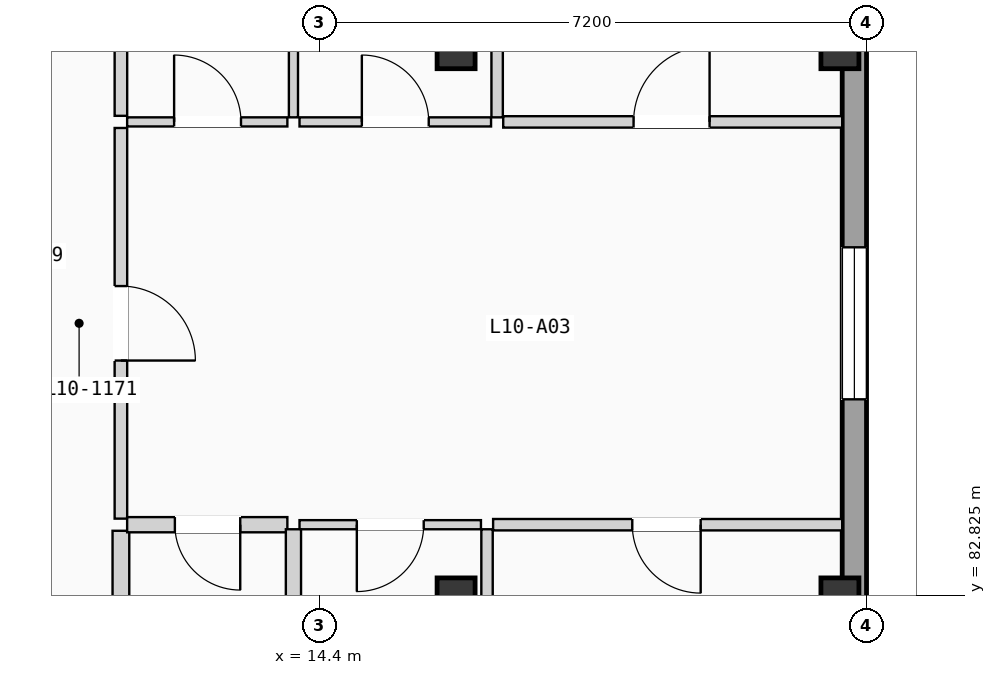
"""IFC4 building model, lengths in metres.
Left out: names, types, materials, properties, quantities, classifications, styles, units other than length and angle.
Written with IfcOpenShell. Run it as: python <this file> out.ifc"""

import sys

from ifc_helpers import new_model, si_unit, direction, frame, frame_2d, origin, origin_2d, place, context, subcontext, project, spatial, rectangle, extrude, element, fill, save


model = new_model("IFC4")
c1 = context("Model", 3, precision=1e-05, world=origin(), true_north=direction((0.0, 1.0)))
c2 = subcontext(c1, "Body", "Model", "MODEL_VIEW")
j1 = project(units=[si_unit("LENGTHUNIT", "METRE"), si_unit("PLANEANGLEUNIT", "RADIAN")], contexts=[c1])
p1 = place(None, origin())
s1 = spatial("IfcSite", under=j1, at=p1, CompositionType="ELEMENT")
p2 = place(p1, origin())
s2 = spatial("IfcBuilding", under=s1, at=p2, CompositionType="ELEMENT")
p3 = place(p2, frame((0.0, 0.0, 34.125)))
s3 = spatial("IfcBuildingStorey", under=s2, at=p3, CompositionType="ELEMENT", Elevation=34.125)
for number, where, z_axis, x_axis in (
    (1, (16.2, 82.8, 0.0), (0.0, 0.0, 1.0), (1.0, 0.0, 0.0)),
    (2, (16.2, 90.0, 0.0), (0.0, 0.0, 1.0), (1.0, 0.0, 0.0)),
    (3, (21.25, 82.8, 0.0), (0.0, 0.0, 1.0), (1.0, 0.0, 0.0)),
    (4, (21.25, 90.0, 0.0), (0.0, 0.0, 1.0), (1.0, 0.0, 0.0)),
):
    element("IfcColumn", number, at=place(p3, frame(where, z_axis=z_axis, x_axis=x_axis)), inside=s3, PredefinedType="COLUMN", context=c2, shape_type="SweptSolid", body=[
        extrude(rectangle(XDim=0.5, YDim=0.5, at=origin_2d()), origin(), (0.0, 0.0, 1.0), 3.15),
    ])
p4 = place(p3, frame((21.44, 68.72, 0.0), z_axis=(0.0, 0.0, 1.0), x_axis=(0.0, 1.0, 0.0)))
e5 = element("IfcWall", 5, at=p4, inside=s3, PredefinedType="SOLIDWALL", context=c2, shape_type="SweptSolid", body=[
    extrude(rectangle(XDim=49.76, YDim=0.32, at=frame_2d((24.88, 0.0))), origin(), (0.0, 0.0, 1.0), 2.89),
])
p5 = place(p4, frame((16.68, 0.0, 0.555)))
e6 = element("IfcOpeningElement", 6, at=p5, cuts=e5, PredefinedType="OPENING", context=c2, shape_type="SweptSolid", body=[
    extrude(rectangle(XDim=2.0, YDim=1.65, at=frame_2d((1.0, 0.825))), frame((0.0, 0.17, 0.0), z_axis=(0.0, -1.0, 0.0), x_axis=(1.0, 0.0, 0.0)), (0.0, 0.0, 1.0), 0.34),
])
p6 = place(p4, frame((10.07, 0.0, 0.85)))
e7 = element("IfcOpeningElement", 7, at=p6, cuts=e5, PredefinedType="OPENING", context=c2, shape_type="SweptSolid", body=[
    extrude(rectangle(XDim=0.95, YDim=1.2, at=frame_2d((0.475, 0.6))), frame((0.0, 0.17, 0.0), z_axis=(0.0, -1.0, 0.0), x_axis=(1.0, 0.0, 0.0)), (0.0, 0.0, 1.0), 0.34),
])
p7 = place(p4, frame((23.805, 0.0, 0.9)))
e8 = element("IfcOpeningElement", 8, at=p7, cuts=e5, PredefinedType="OPENING", context=c2, shape_type="SweptSolid", body=[
    extrude(rectangle(XDim=2.15, YDim=1.2, at=frame_2d((1.075, 0.6))), frame((0.0, 0.17, 0.0), z_axis=(0.0, -1.0, 0.0), x_axis=(1.0, 0.0, 0.0)), (0.0, 0.0, 1.0), 0.34),
])
p8 = place(p4, frame((33.684, 0.0, 0.85)))
e9 = element("IfcOpeningElement", 9, at=p8, cuts=e5, PredefinedType="OPENING", context=c2, shape_type="SweptSolid", body=[
    extrude(rectangle(XDim=0.95, YDim=1.2, at=frame_2d((0.475, 0.6))), frame((0.0, 0.17, 0.0), z_axis=(0.0, -1.0, 0.0), x_axis=(1.0, 0.0, 0.0)), (0.0, 0.0, 1.0), 0.34),
])
p9 = place(p4, frame((29.674, 0.0, 0.705)))
e10 = element("IfcOpeningElement", 10, at=p9, cuts=e5, PredefinedType="OPENING", context=c2, shape_type="SweptSolid", body=[
    extrude(rectangle(XDim=2.15, YDim=1.5, at=frame_2d((1.075, 0.75))), frame((0.0, 0.17, 0.0), z_axis=(0.0, -1.0, 0.0), x_axis=(1.0, 0.0, 0.0)), (0.0, 0.0, 1.0), 0.34),
])
p10 = place(p4, frame((39.276, 0.0, 0.555)))
e11 = element("IfcOpeningElement", 11, at=p10, cuts=e5, PredefinedType="OPENING", context=c2, shape_type="SweptSolid", body=[
    extrude(rectangle(XDim=2.15, YDim=1.65, at=frame_2d((1.075, 0.825))), frame((0.0, 0.17, 0.0), z_axis=(0.0, -1.0, 0.0), x_axis=(1.0, 0.0, 0.0)), (0.0, 0.0, 1.0), 0.34),
])
p11 = place(p3, frame((11.79, 83.83, 0.0), z_axis=(0.0, 0.0, 1.0), x_axis=(0.0, 1.0, 0.0)))
e12 = element("IfcWall", 12, at=p11, inside=s3, PredefinedType="PARTITIONING", context=c2, shape_type="SweptSolid", body=[
    extrude(rectangle(XDim=5.14, YDim=0.165, at=frame_2d((2.57, 0.0))), origin(), (0.0, 0.0, 1.0), 2.87),
])
p12 = place(p11, frame((2.08, 0.0, 0.0)))
e13 = element("IfcOpeningElement", 13, at=p12, cuts=e12, PredefinedType="OPENING", context=c2, shape_type="SweptSolid", body=[
    extrude(rectangle(XDim=0.98, YDim=2.08, at=frame_2d((0.49, 1.04))), frame((0.0, 0.093, 0.0), z_axis=(0.0, -1.0, 0.0), x_axis=(1.0, 0.0, 0.0)), (0.0, 0.0, 1.0), 0.185),
])
p13 = place(p3, frame((11.79, 75.975, 0.0), z_axis=(0.0, 0.0, 1.0), x_axis=(0.0, 1.0, 0.0)))
e14 = element("IfcWall", 14, at=p13, inside=s3, PredefinedType="PLUMBINGWALL", context=c2, shape_type="SweptSolid", body=[
    extrude(rectangle(XDim=7.695, YDim=0.22, at=frame_2d((3.847, 0.0))), origin(), (0.0, 0.0, 1.0), 2.87),
])
p14 = place(p3, frame((11.79, 89.13, 0.0), z_axis=(0.0, 0.0, 1.0), x_axis=(0.0, 1.0, 0.0)))
e15 = element("IfcWall", 15, at=p14, inside=s3, PredefinedType="PARTITIONING", context=c2, shape_type="SweptSolid", body=[
    extrude(rectangle(XDim=7.9, YDim=0.165, at=frame_2d((3.95, 0.0))), origin(), (0.0, 0.0, 1.0), 2.87),
])
p15 = place(p3, frame((11.872, 83.75, 0.0), z_axis=(0.0, 0.0, 1.0), x_axis=(1.0, 0.0, 0.0)))
e16 = element("IfcWall", 16, at=p15, inside=s3, PredefinedType="PLUMBINGWALL", context=c2, shape_type="SweptSolid", body=[
    extrude(rectangle(XDim=2.108, YDim=0.2, at=frame_2d((1.054, 0.0))), origin(), (0.0, 0.0, 1.0), 2.87),
])
p16 = place(p15, frame((0.628, 0.0, 0.0)))
e17 = element("IfcOpeningElement", 17, at=p16, cuts=e16, PredefinedType="OPENING", context=c2, shape_type="SweptSolid", body=[
    extrude(rectangle(XDim=0.86, YDim=2.0, at=frame_2d((0.43, 1.0))), frame((0.0, 0.11, 0.0), z_axis=(0.0, -1.0, 0.0), x_axis=(1.0, 0.0, 0.0)), (0.0, 0.0, 1.0), 0.22),
])
p17 = place(p3, frame((11.872, 89.05, 0.0), z_axis=(0.0, 0.0, 1.0), x_axis=(1.0, 0.0, 0.0)))
e18 = element("IfcWall", 18, at=p17, inside=s3, PredefinedType="PARTITIONING", context=c2, shape_type="SweptSolid", body=[
    extrude(rectangle(XDim=2.108, YDim=0.12, at=frame_2d((1.054, 0.0))), origin(), (0.0, 0.0, 1.0), 2.87),
])
p18 = place(p17, frame((0.618, 0.0, 0.0)))
e19 = element("IfcOpeningElement", 19, at=p18, cuts=e18, PredefinedType="OPENING", context=c2, shape_type="SweptSolid", body=[
    extrude(rectangle(XDim=0.88, YDim=2.02, at=frame_2d((0.44, 1.01))), frame((0.0, 0.07, 0.0), z_axis=(0.0, -1.0, 0.0), x_axis=(1.0, 0.0, 0.0)), (0.0, 0.0, 1.0), 0.14),
])
p19 = place(p3, frame((16.687, 83.75, 0.0), z_axis=(0.0, 0.0, 1.0), x_axis=(1.0, 0.0, 0.0)))
e20 = element("IfcWall", 20, at=p19, inside=s3, PredefinedType="PARTITIONING", context=c2, shape_type="SweptSolid", body=[
    extrude(rectangle(XDim=4.593, YDim=0.15, at=frame_2d((2.296, 0.0))), origin(), (0.0, 0.0, 1.0), 2.87),
])
p20 = place(p19, frame((1.831, 0.0, 0.0)))
e21 = element("IfcOpeningElement", 21, at=p20, cuts=e20, PredefinedType="OPENING", context=c2, shape_type="SweptSolid", body=[
    extrude(rectangle(XDim=0.9, YDim=2.04, at=frame_2d((0.45, 1.02))), frame((0.0, 0.085, 0.0), z_axis=(0.0, -1.0, 0.0), x_axis=(1.0, 0.0, 0.0)), (0.0, 0.0, 1.0), 0.17),
])
p21 = place(p3, frame((14.14, 83.75, 0.0), z_axis=(0.0, 0.0, 1.0), x_axis=(1.0, 0.0, 0.0)))
e22 = element("IfcWall", 22, at=p21, inside=s3, PredefinedType="PARTITIONING", context=c2, shape_type="SweptSolid", body=[
    extrude(rectangle(XDim=2.387, YDim=0.12, at=frame_2d((1.194, 0.0))), origin(), (0.0, 0.0, 1.0), 2.87),
])
p22 = place(p21, frame((0.754, 0.0, 0.0)))
e23 = element("IfcOpeningElement", 23, at=p22, cuts=e22, PredefinedType="OPENING", context=c2, shape_type="SweptSolid", body=[
    extrude(rectangle(XDim=0.88, YDim=2.02, at=frame_2d((0.44, 1.01))), frame((0.0, 0.07, 0.0), z_axis=(0.0, -1.0, 0.0), x_axis=(1.0, 0.0, 0.0)), (0.0, 0.0, 1.0), 0.14),
])
p23 = place(p3, frame((16.82, 89.05, 0.0), z_axis=(0.0, 0.0, 1.0), x_axis=(1.0, 0.0, 0.0)))
e24 = element("IfcWall", 24, at=p23, inside=s3, PredefinedType="PARTITIONING", context=c2, shape_type="SweptSolid", body=[
    extrude(rectangle(XDim=4.46, YDim=0.15, at=frame_2d((2.23, 0.0))), origin(), (0.0, 0.0, 1.0), 2.87),
])
p24 = place(p23, frame((1.715, 0.0, 0.0)))
e25 = element("IfcOpeningElement", 25, at=p24, cuts=e24, PredefinedType="OPENING", context=c2, shape_type="SweptSolid", body=[
    extrude(rectangle(XDim=1.0, YDim=2.06, at=frame_2d((0.5, 1.03))), frame((0.0, 0.085, 0.0), z_axis=(0.0, -1.0, 0.0), x_axis=(1.0, 0.0, 0.0)), (0.0, 0.0, 1.0), 0.17),
])
p25 = place(p3, frame((14.14, 89.05, 0.0), z_axis=(0.0, 0.0, 1.0), x_axis=(1.0, 0.0, 0.0)))
e26 = element("IfcWall", 26, at=p25, inside=s3, PredefinedType="PARTITIONING", context=c2, shape_type="SweptSolid", body=[
    extrude(rectangle(XDim=2.52, YDim=0.12, at=frame_2d((1.26, 0.0))), origin(), (0.0, 0.0, 1.0), 2.87),
])
p26 = place(p25, frame((0.82, 0.0, 0.0)))
e27 = element("IfcOpeningElement", 27, at=p26, cuts=e26, PredefinedType="OPENING", context=c2, shape_type="SweptSolid", body=[
    extrude(rectangle(XDim=0.88, YDim=2.02, at=frame_2d((0.44, 1.01))), frame((0.0, 0.07, 0.0), z_axis=(0.0, -1.0, 0.0), x_axis=(1.0, 0.0, 0.0)), (0.0, 0.0, 1.0), 0.14),
])
p27 = place(p3, frame((14.06, 75.975, 0.0), z_axis=(0.0, 0.0, 1.0), x_axis=(0.0, 1.0, 0.0)))
e28 = element("IfcWall", 28, at=p27, inside=s3, PredefinedType="PLUMBINGWALL", context=c2, shape_type="SweptSolid", body=[
    extrude(rectangle(XDim=7.715, YDim=0.2, at=frame_2d((3.857, 0.0))), origin(), (0.0, 0.0, 1.0), 2.87),
])
p28 = place(p27, frame((3.435, 0.0, 0.0)))
e29 = element("IfcOpeningElement", 29, at=p28, cuts=e28, PredefinedType="OPENING", context=c2, shape_type="SweptSolid", body=[
    extrude(rectangle(XDim=0.85, YDim=2.01, at=frame_2d((0.425, 1.005))), frame((0.0, 0.11, 0.0), z_axis=(0.0, -1.0, 0.0), x_axis=(1.0, 0.0, 0.0)), (0.0, 0.0, 1.0), 0.22),
])
p29 = place(p3, frame((14.06, 89.11, 0.0), z_axis=(0.0, 0.0, 1.0), x_axis=(0.0, 1.0, 0.0)))
e30 = element("IfcWall", 30, at=p29, inside=s3, PredefinedType="PARTITIONING", context=c2, shape_type="SweptSolid", body=[
    extrude(rectangle(XDim=7.92, YDim=0.12, at=frame_2d((3.96, 0.0))), origin(), (0.0, 0.0, 1.0), 2.87),
])
p30 = place(p3, frame((16.607, 76.0, 0.0), z_axis=(0.0, 0.0, 1.0), x_axis=(0.0, 1.0, 0.0)))
e31 = element("IfcWall", 31, at=p30, inside=s3, PredefinedType="PARTITIONING", context=c2, shape_type="SweptSolid", body=[
    extrude(rectangle(XDim=7.69, YDim=0.15, at=frame_2d((3.845, 0.0))), origin(), (0.0, 0.0, 1.0), 2.87),
])
p31 = place(p3, frame((16.74, 89.11, 0.0), z_axis=(0.0, 0.0, 1.0), x_axis=(0.0, 1.0, 0.0)))
e32 = element("IfcWall", 32, at=p31, inside=s3, PredefinedType="PARTITIONING", context=c2, shape_type="SweptSolid", body=[
    extrude(rectangle(XDim=7.92, YDim=0.15, at=frame_2d((3.96, 0.0))), origin(), (0.0, 0.0, 1.0), 2.87),
])
p32 = place(p5, origin())
e33 = element("IfcWindow", 33, at=p32, inside=s3, PartitioningType="DOUBLE_PANEL_VERTICAL", PredefinedType="WINDOW", context=c2, shape_type="SweptSolid", body=[
    extrude(rectangle(XDim=2.0, YDim=1.65, at=frame_2d((1.0, 0.825))), frame((0.0, 0.03, 0.0), z_axis=(0.0, -1.0, 0.0), x_axis=(1.0, 0.0, 0.0)), (0.0, 0.0, 1.0), 0.06),
])
fill(e6, e33)
p33 = place(p12, frame((0.98, 0.0, 0.0), z_axis=(0.0, 0.0, 1.0), x_axis=(-1.0, 0.0, 0.0)))
e34 = element("IfcDoor", 34, at=p33, inside=s3, OperationType="SINGLE_SWING_LEFT", PredefinedType="DOOR", context=c2, shape_type="SweptSolid", body=[
    extrude(rectangle(XDim=0.98, YDim=2.08, at=frame_2d((0.49, 1.04))), frame((0.0, 0.025, 0.0), z_axis=(0.0, -1.0, 0.0), x_axis=(1.0, 0.0, 0.0)), (0.0, 0.0, 1.0), 0.05),
])
fill(e13, e34)
p34 = place(p16, frame((0.86, 0.0, 0.0), z_axis=(0.0, 0.0, 1.0), x_axis=(-1.0, 0.0, 0.0)))
e35 = element("IfcDoor", 35, at=p34, inside=s3, OperationType="SINGLE_SWING_RIGHT", PredefinedType="DOOR", context=c2, shape_type="SweptSolid", body=[
    extrude(rectangle(XDim=0.86, YDim=2.0, at=frame_2d((0.43, 1.0))), frame((0.0, 0.025, 0.0), z_axis=(0.0, -1.0, 0.0), x_axis=(1.0, 0.0, 0.0)), (0.0, 0.0, 1.0), 0.05),
])
fill(e17, e35)
p35 = place(p18, origin())
e36 = element("IfcDoor", 36, at=p35, inside=s3, OperationType="SINGLE_SWING_LEFT", PredefinedType="DOOR", context=c2, shape_type="SweptSolid", body=[
    extrude(rectangle(XDim=0.88, YDim=2.02, at=frame_2d((0.44, 1.01))), frame((0.0, 0.025, 0.0), z_axis=(0.0, -1.0, 0.0), x_axis=(1.0, 0.0, 0.0)), (0.0, 0.0, 1.0), 0.05),
])
fill(e19, e36)
p36 = place(p20, frame((0.9, 0.0, 0.0), z_axis=(0.0, 0.0, 1.0), x_axis=(-1.0, 0.0, 0.0)))
e37 = element("IfcDoor", 37, at=p36, inside=s3, OperationType="SINGLE_SWING_RIGHT", PredefinedType="DOOR", context=c2, shape_type="SweptSolid", body=[
    extrude(rectangle(XDim=0.9, YDim=2.04, at=frame_2d((0.45, 1.02))), frame((0.0, 0.025, 0.0), z_axis=(0.0, -1.0, 0.0), x_axis=(1.0, 0.0, 0.0)), (0.0, 0.0, 1.0), 0.05),
])
fill(e21, e37)
p37 = place(p22, frame((0.88, 0.0, 0.0), z_axis=(0.0, 0.0, 1.0), x_axis=(-1.0, 0.0, 0.0)))
e38 = element("IfcDoor", 38, at=p37, inside=s3, OperationType="SINGLE_SWING_LEFT", PredefinedType="DOOR", context=c2, shape_type="SweptSolid", body=[
    extrude(rectangle(XDim=0.88, YDim=2.02, at=frame_2d((0.44, 1.01))), frame((0.0, 0.025, 0.0), z_axis=(0.0, -1.0, 0.0), x_axis=(1.0, 0.0, 0.0)), (0.0, 0.0, 1.0), 0.05),
])
fill(e23, e38)
p38 = place(p24, origin())
e39 = element("IfcDoor", 39, at=p38, inside=s3, OperationType="SINGLE_SWING_RIGHT", PredefinedType="DOOR", context=c2, shape_type="SweptSolid", body=[
    extrude(rectangle(XDim=1.0, YDim=2.06, at=frame_2d((0.5, 1.03))), frame((0.0, 0.025, 0.0), z_axis=(0.0, -1.0, 0.0), x_axis=(1.0, 0.0, 0.0)), (0.0, 0.0, 1.0), 0.05),
])
fill(e25, e39)
p39 = place(p26, origin())
e40 = element("IfcDoor", 40, at=p39, inside=s3, OperationType="SINGLE_SWING_LEFT", PredefinedType="DOOR", context=c2, shape_type="SweptSolid", body=[
    extrude(rectangle(XDim=0.88, YDim=2.02, at=frame_2d((0.44, 1.01))), frame((0.0, 0.025, 0.0), z_axis=(0.0, -1.0, 0.0), x_axis=(1.0, 0.0, 0.0)), (0.0, 0.0, 1.0), 0.05),
])
fill(e27, e40)
save(model, sys.argv[1])
